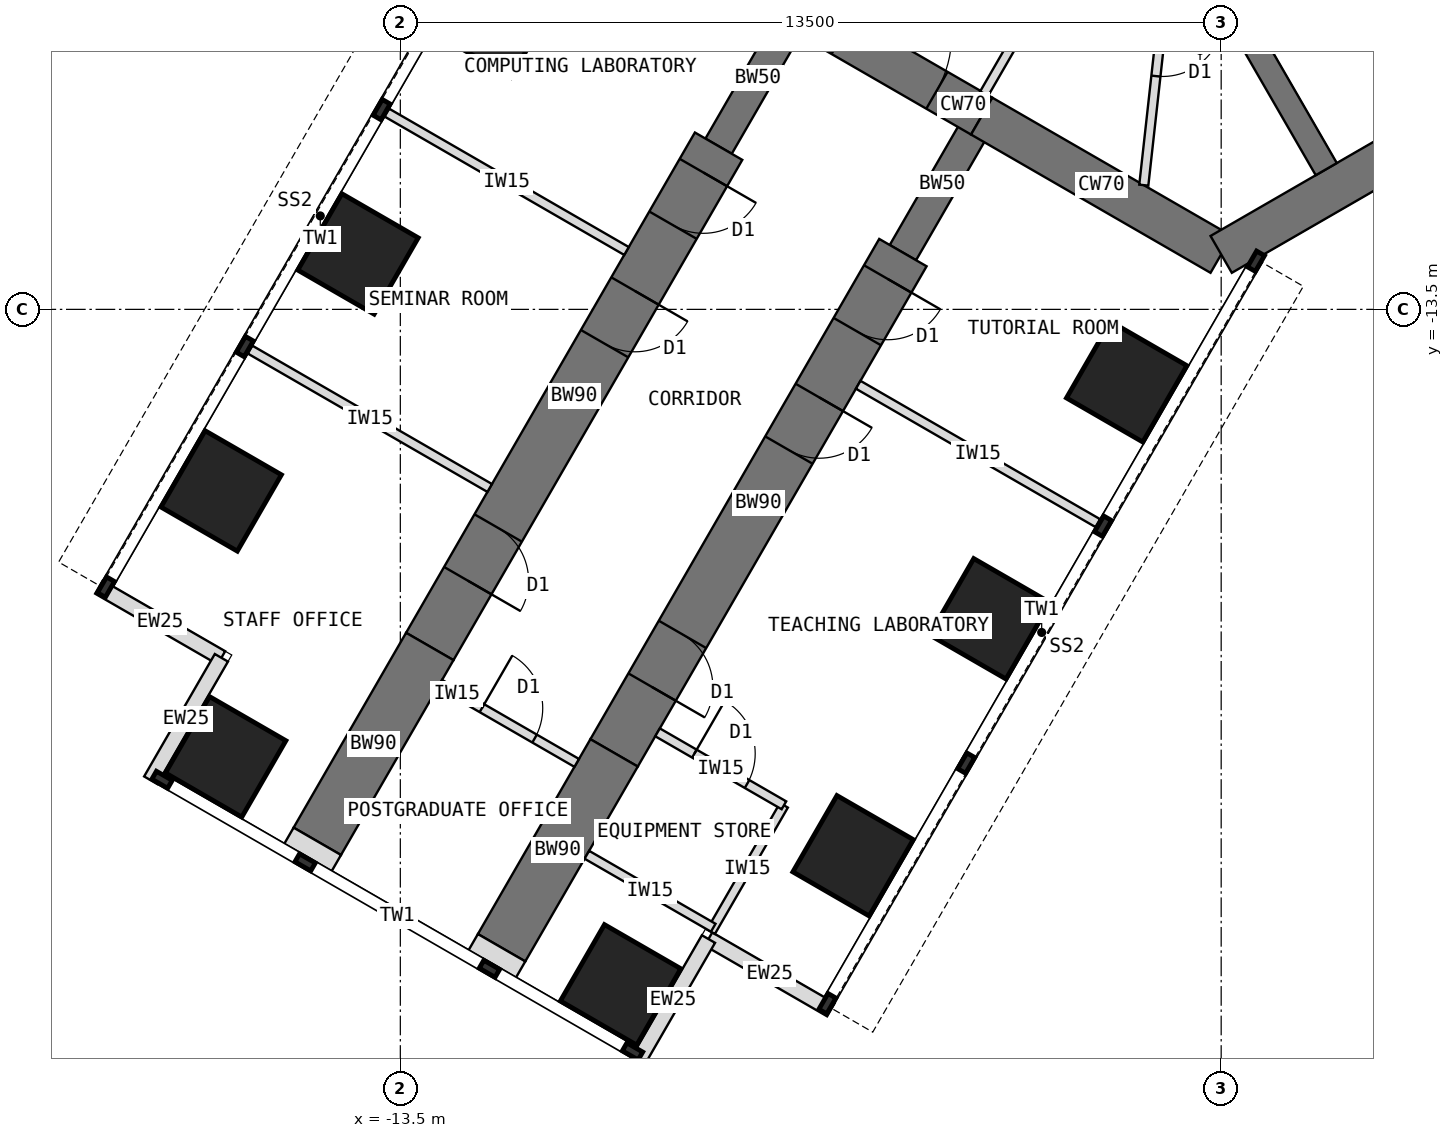
"""IFC4 building model, lengths in metres.
Left out: names, types, materials, properties, quantities, classifications, styles, units other than length and angle.
Written with IfcOpenShell. Run it as: python <this file> out.ifc"""

import sys

from ifc_helpers import new_model, si_unit, direction, frame, frame_2d, origin, origin_2d, place, context, subcontext, project, spatial, rectangle, extrude, element, fill, save


model = new_model("IFC4")
c1 = context("Model", 3, precision=1e-05, world=origin(), true_north=direction((0.0, 1.0)))
c2 = subcontext(c1, "Body", "Model", "MODEL_VIEW")
j1 = project(units=[si_unit("LENGTHUNIT", "METRE"), si_unit("PLANEANGLEUNIT", "RADIAN")], contexts=[c1])
p1 = place(None, origin())
s1 = spatial("IfcSite", under=j1, at=p1, CompositionType="ELEMENT")
p2 = place(p1, origin())
s2 = spatial("IfcBuilding", under=s1, at=p2, CompositionType="ELEMENT")
p3 = place(p2, frame((0.0, 0.0, 56.5)))
s3 = spatial("IfcBuildingStorey", under=s2, at=p3, CompositionType="ELEMENT", Elevation=56.5)
p4 = place(p3, frame((-6.97, -8.572, 0.0), z_axis=(0.0, 0.0, 1.0), x_axis=(0.866019471182, -0.500010275428, 0.0)))
e1 = element("IfcWall", 1, at=p4, inside=s3, PredefinedType="SHEAR", context=c2, shape_type="SweptSolid", body=[
    extrude(rectangle(XDim=3.5, YDim=0.7, at=frame_2d((1.75, 0.0))), origin(), (0.0, 0.0, 1.0), 4.0),
])
p5 = place(p4, frame((0.85, 0.0, 0.0)))
e2 = element("IfcOpeningElement", 2, at=p5, cuts=e1, PredefinedType="OPENING", context=c2, shape_type="SweptSolid", body=[
    extrude(rectangle(XDim=1.8, YDim=2.1, at=frame_2d((0.9, 1.05))), frame((0.0, 0.36, 0.0), z_axis=(0.0, -1.0, 0.0), x_axis=(1.0, 0.0, 0.0)), (0.0, 0.0, 1.0), 0.72),
])
p6 = place(p3, frame((-3.939, -10.322, 0.0), z_axis=(0.0, 0.0, 1.0), x_axis=(0.866011268655, -0.500024481964, 0.0)))
e3 = element("IfcWall", 3, at=p6, inside=s3, PredefinedType="SHEAR", context=c2, shape_type="SweptSolid", body=[
    extrude(rectangle(XDim=4.548, YDim=0.7, at=frame_2d((2.274, 0.0))), origin(), (0.0, 0.0, 1.0), 4.0),
])
p7 = place(p3, frame((0.0, -12.596, 0.0), z_axis=(0.0, 0.0, 1.0), x_axis=(0.866021940709, 0.500005998175, 0.0)))
e4 = element("IfcWall", 4, at=p7, inside=s3, PredefinedType="SHEAR", context=c2, shape_type="SweptSolid", body=[
    extrude(rectangle(XDim=12.596, YDim=0.7, at=frame_2d((6.298, 0.0))), origin(), (0.0, 0.0, 1.0), 4.0),
])
p8 = place(p3, frame((-3.939, -10.322, 0.0), z_axis=(0.0, 0.0, 1.0), x_axis=(-0.499918158782, -0.866072649678, 0.0)))
e5 = element("IfcWall", 5, at=p8, inside=s3, PredefinedType="SHEAR", context=c2, shape_type="SweptSolid", body=[
    extrude(rectangle(XDim=2.592, YDim=0.5, at=frame_2d((1.296, 0.0))), origin(), (0.0, 0.0, 1.0), 4.0),
])
p9 = place(p3, frame((-5.234, -12.566, 0.0), z_axis=(0.0, 0.0, 1.0), x_axis=(-0.499997557548, -0.86602681393, 0.0)))
e6 = element("IfcWall", 6, at=p9, inside=s3, PredefinedType="SHEAR", context=c2, shape_type="SweptSolid", body=[
    extrude(rectangle(XDim=9.5, YDim=0.9, at=frame_2d((4.75, 0.0))), origin(), (0.0, 0.0, 1.0), 4.0),
])
p10 = place(p9, frame((0.5, 0.0, 0.0)))
e7 = element("IfcOpeningElement", 7, at=p10, cuts=e6, PredefinedType="OPENING", context=c2, shape_type="SweptSolid", body=[
    extrude(rectangle(XDim=1.0, YDim=2.1, at=frame_2d((0.5, 1.05))), frame((0.0, 0.46, 0.0), z_axis=(0.0, -1.0, 0.0), x_axis=(1.0, 0.0, 0.0)), (0.0, 0.0, 1.0), 0.92),
])
p11 = place(p9, frame((2.75, 0.0, 0.0)))
e8 = element("IfcOpeningElement", 8, at=p11, cuts=e6, PredefinedType="OPENING", context=c2, shape_type="SweptSolid", body=[
    extrude(rectangle(XDim=1.0, YDim=2.1, at=frame_2d((0.5, 1.05))), frame((0.0, 0.46, 0.0), z_axis=(0.0, -1.0, 0.0), x_axis=(1.0, 0.0, 0.0)), (0.0, 0.0, 1.0), 0.92),
])
p12 = place(p9, frame((7.25, 0.0, 0.0)))
e9 = element("IfcOpeningElement", 9, at=p12, cuts=e6, PredefinedType="OPENING", context=c2, shape_type="SweptSolid", body=[
    extrude(rectangle(XDim=1.0, YDim=2.1, at=frame_2d((0.5, 1.05))), frame((0.0, 0.46, 0.0), z_axis=(0.0, -1.0, 0.0), x_axis=(1.0, 0.0, 0.0)), (0.0, 0.0, 1.0), 0.92),
])
p13 = place(p3, frame((-9.984, -20.794, 0.0), z_axis=(0.0, 0.0, 1.0), x_axis=(-0.500042316284, -0.866000971088, 0.0)))
e10 = element("IfcWall", 10, at=p13, inside=s3, PredefinedType="SHEAR", context=c2, shape_type="SweptSolid", body=[
    extrude(rectangle(XDim=3.7, YDim=0.9, at=frame_2d((1.85, 0.0))), origin(), (0.0, 0.0, 1.0), 4.0),
])
p14 = place(p3, frame((-6.97, -8.572, 0.0), z_axis=(0.0, 0.0, 1.0), x_axis=(-0.499988811324, -0.866031863473, 0.0)))
e11 = element("IfcWall", 11, at=p14, inside=s3, PredefinedType="SHEAR", context=c2, shape_type="SweptSolid", body=[
    extrude(rectangle(XDim=2.592, YDim=0.5, at=frame_2d((1.296, 0.0))), origin(), (0.0, 0.0, 1.0), 4.0),
])
p15 = place(p3, frame((-8.266, -10.816, 0.0), z_axis=(0.0, 0.0, 1.0), x_axis=(-0.499997557548, -0.86602681393, 0.0)))
e12 = element("IfcWall", 12, at=p15, inside=s3, PredefinedType="SHEAR", context=c2, shape_type="SweptSolid", body=[
    extrude(rectangle(XDim=9.5, YDim=0.9, at=frame_2d((4.75, 0.0))), origin(), (0.0, 0.0, 1.0), 4.0),
])
p16 = place(p15, frame((0.5, 0.0, 0.0)))
e13 = element("IfcOpeningElement", 13, at=p16, cuts=e12, PredefinedType="OPENING", context=c2, shape_type="SweptSolid", body=[
    extrude(rectangle(XDim=1.0, YDim=2.1, at=frame_2d((0.5, 1.05))), frame((0.0, 0.46, 0.0), z_axis=(0.0, -1.0, 0.0), x_axis=(1.0, 0.0, 0.0)), (0.0, 0.0, 1.0), 0.92),
])
p17 = place(p15, frame((2.75, 0.0, 0.0)))
e14 = element("IfcOpeningElement", 14, at=p17, cuts=e12, PredefinedType="OPENING", context=c2, shape_type="SweptSolid", body=[
    extrude(rectangle(XDim=1.0, YDim=2.1, at=frame_2d((0.5, 1.05))), frame((0.0, 0.46, 0.0), z_axis=(0.0, -1.0, 0.0), x_axis=(1.0, 0.0, 0.0)), (0.0, 0.0, 1.0), 0.92),
])
p18 = place(p15, frame((7.25, 0.0, 0.0)))
e15 = element("IfcOpeningElement", 15, at=p18, cuts=e12, PredefinedType="OPENING", context=c2, shape_type="SweptSolid", body=[
    extrude(rectangle(XDim=1.0, YDim=2.1, at=frame_2d((0.5, 1.05))), frame((0.0, 0.46, 0.0), z_axis=(0.0, -1.0, 0.0), x_axis=(1.0, 0.0, 0.0)), (0.0, 0.0, 1.0), 0.92),
])
p19 = place(p3, frame((-13.016, -19.044, 0.0), z_axis=(0.0, 0.0, 1.0), x_axis=(-0.499992827086, -0.866029545028, 0.0)))
e16 = element("IfcWall", 16, at=p19, inside=s3, PredefinedType="SHEAR", context=c2, shape_type="SweptSolid", body=[
    extrude(rectangle(XDim=3.7, YDim=0.9, at=frame_2d((1.85, 0.0))), origin(), (0.0, 0.0, 1.0), 4.0),
])
for number, where, z_axis, x_axis in (
    (17, (-1.554, -14.691, 0.0), (0.0, 0.0, 1.0), (0.5, 0.866, 0.0)),
    (18, (-11.946, -8.691, 0.0), (0.0, 0.0, 1.0), (0.5, 0.866, 0.0)),
    (19, (-3.804, -18.588, 0.0), (0.0, 0.0, 1.0), (0.5, 0.866, 0.0)),
    (20, (-14.196, -12.588, 0.0), (0.0, 0.0, 1.0), (0.5, 0.866, 0.0)),
    (21, (-6.054, -22.486, 0.0), (0.0, 0.0, 1.0), (0.5, 0.866, 0.0)),
    (22, (-16.446, -16.486, 0.0), (0.0, 0.0, 1.0), (0.5, 0.866, 0.0)),
    (23, (-9.877, -24.608, 0.0), (0.0, 0.0, 1.0), (0.5, 0.866, 0.0)),
    (24, (-16.373, -20.858, 0.0), (0.0, 0.0, 1.0), (0.5, 0.866, 0.0)),
):
    element("IfcColumn", number, at=place(p3, frame(where, z_axis=z_axis, x_axis=x_axis)), inside=s3, PredefinedType="COLUMN", context=c2, shape_type="SweptSolid", body=[
        extrude(rectangle(XDim=1.45, YDim=1.45, at=origin_2d()), origin(), (0.0, 0.0, 1.0), 4.0),
    ])
for number, where, z_axis, x_axis in (
    (25, (-6.419, -25.017, 0.0), (0.0, 0.0, 1.0), (-0.866, 0.5, 0.0)),
    (26, (-8.432, -23.855, 0.0), (0.0, 0.0, 1.0), (-0.5, -0.866, 0.0)),
    (27, (-18.456, -18.067, 0.0), (0.0, 0.0, 1.0), (0.866, -0.5, 0.0)),
    (28, (-16.443, -19.23, 0.0), (0.0, 0.0, 1.0), (-0.5, -0.866, 0.0)),
):
    element("IfcWall", number, at=place(p3, frame(where, z_axis=z_axis, x_axis=x_axis)), inside=s3, PredefinedType="STANDARD", context=c2, shape_type="SweptSolid", body=[
        extrude(rectangle(XDim=2.325, YDim=0.25, at=frame_2d((1.163, 0.0))), origin(), (0.0, 0.0, 1.0), 3.8),
    ])
for number, where, z_axis, x_axis in (
    (29, (-11.834, -23.998, 0.0), (0.0, 0.0, 1.0), (-0.5, -0.866, 0.0)),
    (30, (-14.865, -22.248, 0.0), (0.0, 0.0, 1.0), (-0.5, -0.866, 0.0)),
):
    element("IfcWall", number, at=place(p3, frame(where, z_axis=z_axis, x_axis=x_axis)), inside=s3, PredefinedType="PARTITIONING", context=c2, shape_type="SweptSolid", body=[
        extrude(rectangle(XDim=0.31, YDim=0.9, at=frame_2d((0.155, 0.0))), origin(), (0.0, 0.0, 1.0), 3.8),
    ])
p20 = place(p3, frame((-1.201, -6.12, 0.0), z_axis=(0.0, 0.0, 1.0), x_axis=(0.500002627198, -0.866023886965, 0.0)))
e31 = element("IfcWall", 31, at=p20, inside=s3, PredefinedType="SHEAR", context=c2, shape_type="SweptSolid", body=[
    extrude(rectangle(XDim=5.858, YDim=0.4, at=frame_2d((2.929, 0.0))), origin(), (0.0, 0.0, 1.0), 4.0),
])
p21 = place(p3, frame((-5.97, -14.74, 0.0), z_axis=(0.0, 0.0, 1.0), x_axis=(0.866035472144, -0.499982560684, 0.0)))
e32 = element("IfcWall", 32, at=p21, inside=s3, PredefinedType="PARTITIONING", context=c2, shape_type="SweptSolid", body=[
    extrude(rectangle(XDim=4.55, YDim=0.15, at=frame_2d((2.275, 0.0))), origin(), (0.0, 0.0, 1.0), 3.8),
])
p22 = place(p3, frame((-7.191, -21.656, 0.0), z_axis=(0.0, 0.0, 1.0), x_axis=(-0.500077600433, -0.865980596518, 0.0)))
e33 = element("IfcWall", 33, at=p22, inside=s3, PredefinedType="PARTITIONING", context=c2, shape_type="SweptSolid", body=[
    extrude(rectangle(XDim=2.4, YDim=0.15, at=frame_2d((1.2, 0.0))), origin(), (0.0, 0.0, 1.0), 3.8),
])
p23 = place(p3, frame((-9.27, -20.456, 0.0), z_axis=(0.0, 0.0, 1.0), x_axis=(0.866006032174, -0.500033551112, 0.0)))
e34 = element("IfcWall", 34, at=p23, inside=s3, PredefinedType="PARTITIONING", context=c2, shape_type="SweptSolid", body=[
    extrude(rectangle(XDim=2.4, YDim=0.15, at=frame_2d((1.2, 0.0))), origin(), (0.0, 0.0, 1.0), 3.8),
])
p24 = place(p23, frame((0.7, 0.0, 0.0)))
e35 = element("IfcOpeningElement", 35, at=p24, cuts=e34, PredefinedType="OPENING", context=c2, shape_type="SweptSolid", body=[
    extrude(rectangle(XDim=1.0, YDim=2.1, at=frame_2d((0.5, 1.05))), frame((0.0, 0.085, 0.0), z_axis=(0.0, -1.0, 0.0), x_axis=(1.0, 0.0, 0.0)), (0.0, 0.0, 1.0), 0.17),
])
p25 = place(p3, frame((-10.432, -22.469, 0.0), z_axis=(0.0, 0.0, 1.0), x_axis=(0.866024647952, -0.500001309137, 0.0)))
e36 = element("IfcWall", 36, at=p25, inside=s3, PredefinedType="PARTITIONING", context=c2, shape_type="SweptSolid", body=[
    extrude(rectangle(XDim=2.4, YDim=0.15, at=frame_2d((1.2, 0.0))), origin(), (0.0, 0.0, 1.0), 3.8),
])
for number, where, z_axis, x_axis in (
    (37, (-9.78, -12.54, 0.0), (0.0, 0.0, 1.0), (-0.866, 0.5, 0.0)),
    (38, (-12.03, -16.437, 0.0), (0.0, 0.0, 1.0), (-0.866, 0.5, 0.0)),
):
    element("IfcWall", number, at=place(p3, frame(where, z_axis=z_axis, x_axis=x_axis)), inside=s3, PredefinedType="PARTITIONING", context=c2, shape_type="SweptSolid", body=[
        extrude(rectangle(XDim=4.55, YDim=0.15, at=frame_2d((2.275, 0.0))), origin(), (0.0, 0.0, 1.0), 3.8),
    ])
p26 = place(p3, frame((-1.664, -6.083, 0.0), z_axis=(0.0, 0.0, 1.0), x_axis=(-0.499999927604, -0.866025445582, 0.0)))
e39 = element("IfcWall", 39, at=p26, inside=s3, PredefinedType="PARTITIONING", context=c2, shape_type="SweptSolid", body=[
    extrude(rectangle(XDim=4.468, YDim=0.15, at=frame_2d((2.234, 0.0))), origin(), (0.0, 0.0, 1.0), 3.8),
])
p27 = place(p26, frame((1.744, 0.0, 0.0)))
e40 = element("IfcOpeningElement", 40, at=p27, cuts=e39, PredefinedType="OPENING", context=c2, shape_type="SweptSolid", body=[
    extrude(rectangle(XDim=1.0, YDim=2.1, at=frame_2d((0.5, 1.05))), frame((0.0, 0.085, 0.0), z_axis=(0.0, -1.0, 0.0), x_axis=(1.0, 0.0, 0.0)), (0.0, 0.0, 1.0), 0.17),
])
p28 = place(p3, frame((-0.764, -6.877, 0.0), z_axis=(0.0, 0.0, 1.0), x_axis=(-0.110408266965, -0.993886318744, 0.0)))
e41 = element("IfcWall", 41, at=p28, inside=s3, PredefinedType="PARTITIONING", context=c2, shape_type="SweptSolid", body=[
    extrude(rectangle(XDim=4.608, YDim=0.15, at=frame_2d((2.304, 0.0))), origin(), (0.0, 0.0, 1.0), 3.8),
])
p29 = place(p28, frame((1.804, 0.0, 0.0)))
e42 = element("IfcOpeningElement", 42, at=p29, cuts=e41, PredefinedType="OPENING", context=c2, shape_type="SweptSolid", body=[
    extrude(rectangle(XDim=1.0, YDim=2.1, at=frame_2d((0.5, 1.05))), frame((0.0, 0.085, 0.0), z_axis=(0.0, -1.0, 0.0), x_axis=(1.0, 0.0, 0.0)), (0.0, 0.0, 1.0), 0.17),
])
p30 = place(p3, frame((-12.851, -19.658, 0.0), z_axis=(0.0, 0.0, 1.0), x_axis=(0.866021400173, -0.500006934395, 0.0)))
e43 = element("IfcWall", 43, at=p30, inside=s3, PredefinedType="PARTITIONING", context=c2, shape_type="SweptSolid", body=[
    extrude(rectangle(XDim=2.6, YDim=0.15, at=frame_2d((1.3, 0.0))), origin(), (0.0, 0.0, 1.0), 3.8),
])
p31 = place(p30, frame((0.8, 0.0, 0.0)))
e44 = element("IfcOpeningElement", 44, at=p31, cuts=e43, PredefinedType="OPENING", context=c2, shape_type="SweptSolid", body=[
    extrude(rectangle(XDim=1.0, YDim=2.1, at=frame_2d((0.5, 1.05))), frame((0.0, 0.085, 0.0), z_axis=(0.0, -1.0, 0.0), x_axis=(1.0, 0.0, 0.0)), (0.0, 0.0, 1.0), 0.17),
])
p32 = place(p5, origin())
e45 = element("IfcDoor", 45, at=p32, inside=s3, OperationType="DOUBLE_DOOR_DOUBLE_SWING", PredefinedType="DOOR", context=c2, shape_type="SweptSolid", body=[
    extrude(rectangle(XDim=1.72, YDim=2.06, at=frame_2d((0.9, 1.03))), frame((0.0, 0.025, 0.0), z_axis=(0.0, -1.0, 0.0), x_axis=(1.0, 0.0, 0.0)), (0.0, 0.0, 1.0), 0.05),
    extrude(rectangle(XDim=0.04, YDim=2.1, at=frame_2d((0.02, 1.05))), frame((0.0, 0.35, 0.0), z_axis=(0.0, -1.0, 0.0), x_axis=(1.0, 0.0, 0.0)), (0.0, 0.0, 1.0), 0.699),
    extrude(rectangle(XDim=0.04, YDim=2.1, at=frame_2d((1.78, 1.05))), frame((0.0, 0.35, 0.0), z_axis=(0.0, -1.0, 0.0), x_axis=(1.0, 0.0, 0.0)), (0.0, 0.0, 1.0), 0.699),
    extrude(rectangle(XDim=1.72, YDim=0.04, at=frame_2d((0.9, 2.08))), frame((0.0, 0.35, 0.0), z_axis=(0.0, -1.0, 0.0), x_axis=(1.0, 0.0, 0.0)), (0.0, 0.0, 1.0), 0.699),
])
fill(e2, e45)
p33 = place(p24, origin())
e46 = element("IfcDoor", 46, at=p33, inside=s3, OperationType="SINGLE_SWING_LEFT", PredefinedType="DOOR", context=c2, shape_type="SweptSolid", body=[
    extrude(rectangle(XDim=1.0, YDim=2.1, at=frame_2d((0.5, 1.05))), frame((0.0, 0.025, 0.0), z_axis=(0.0, -1.0, 0.0), x_axis=(1.0, 0.0, 0.0)), (0.0, 0.0, 1.0), 0.05),
])
fill(e35, e46)
p34 = place(p29, origin())
e47 = element("IfcDoor", 47, at=p34, inside=s3, OperationType="SINGLE_SWING_LEFT", PredefinedType="DOOR", context=c2, shape_type="SweptSolid", body=[
    extrude(rectangle(XDim=1.0, YDim=2.1, at=frame_2d((0.5, 1.05))), frame((0.0, 0.025, 0.0), z_axis=(0.0, -1.0, 0.0), x_axis=(1.0, 0.0, 0.0)), (0.0, 0.0, 1.0), 0.05),
])
fill(e42, e47)
p35 = place(p31, origin())
e48 = element("IfcDoor", 48, at=p35, inside=s3, OperationType="SINGLE_SWING_LEFT", PredefinedType="DOOR", context=c2, shape_type="SweptSolid", body=[
    extrude(rectangle(XDim=1.0, YDim=2.1, at=frame_2d((0.5, 1.05))), frame((0.0, 0.025, 0.0), z_axis=(0.0, -1.0, 0.0), x_axis=(1.0, 0.0, 0.0)), (0.0, 0.0, 1.0), 0.05),
])
fill(e44, e48)
p36 = place(p10, origin())
e49 = element("IfcDoor", 49, at=p36, inside=s3, OperationType="SINGLE_SWING_LEFT", PredefinedType="DOOR", context=c2, shape_type="SweptSolid", body=[
    extrude(rectangle(XDim=0.92, YDim=2.06, at=frame_2d((0.5, 1.03))), frame((0.0, 0.025, 0.0), z_axis=(0.0, -1.0, 0.0), x_axis=(1.0, 0.0, 0.0)), (0.0, 0.0, 1.0), 0.05),
    extrude(rectangle(XDim=0.04, YDim=2.1, at=frame_2d((0.02, 1.05))), frame((0.0, 0.45, 0.0), z_axis=(0.0, -1.0, 0.0), x_axis=(1.0, 0.0, 0.0)), (0.0, 0.0, 1.0), 0.899),
    extrude(rectangle(XDim=0.04, YDim=2.1, at=frame_2d((0.98, 1.05))), frame((0.0, 0.45, 0.0), z_axis=(0.0, -1.0, 0.0), x_axis=(1.0, 0.0, 0.0)), (0.0, 0.0, 1.0), 0.899),
    extrude(rectangle(XDim=0.92, YDim=0.04, at=frame_2d((0.5, 2.08))), frame((0.0, 0.45, 0.0), z_axis=(0.0, -1.0, 0.0), x_axis=(1.0, 0.0, 0.0)), (0.0, 0.0, 1.0), 0.899),
])
fill(e7, e49)
p37 = place(p11, origin())
e50 = element("IfcDoor", 50, at=p37, inside=s3, OperationType="SINGLE_SWING_LEFT", PredefinedType="DOOR", context=c2, shape_type="SweptSolid", body=[
    extrude(rectangle(XDim=0.92, YDim=2.06, at=frame_2d((0.5, 1.03))), frame((0.0, 0.025, 0.0), z_axis=(0.0, -1.0, 0.0), x_axis=(1.0, 0.0, 0.0)), (0.0, 0.0, 1.0), 0.05),
    extrude(rectangle(XDim=0.04, YDim=2.1, at=frame_2d((0.02, 1.05))), frame((0.0, 0.45, 0.0), z_axis=(0.0, -1.0, 0.0), x_axis=(1.0, 0.0, 0.0)), (0.0, 0.0, 1.0), 0.899),
    extrude(rectangle(XDim=0.04, YDim=2.1, at=frame_2d((0.98, 1.05))), frame((0.0, 0.45, 0.0), z_axis=(0.0, -1.0, 0.0), x_axis=(1.0, 0.0, 0.0)), (0.0, 0.0, 1.0), 0.899),
    extrude(rectangle(XDim=0.92, YDim=0.04, at=frame_2d((0.5, 2.08))), frame((0.0, 0.45, 0.0), z_axis=(0.0, -1.0, 0.0), x_axis=(1.0, 0.0, 0.0)), (0.0, 0.0, 1.0), 0.899),
])
fill(e8, e50)
p38 = place(p12, origin())
e51 = element("IfcDoor", 51, at=p38, inside=s3, OperationType="SINGLE_SWING_RIGHT", PredefinedType="DOOR", context=c2, shape_type="SweptSolid", body=[
    extrude(rectangle(XDim=0.92, YDim=2.06, at=frame_2d((0.5, 1.03))), frame((0.0, 0.025, 0.0), z_axis=(0.0, -1.0, 0.0), x_axis=(1.0, 0.0, 0.0)), (0.0, 0.0, 1.0), 0.05),
    extrude(rectangle(XDim=0.04, YDim=2.1, at=frame_2d((0.02, 1.05))), frame((0.0, 0.45, 0.0), z_axis=(0.0, -1.0, 0.0), x_axis=(1.0, 0.0, 0.0)), (0.0, 0.0, 1.0), 0.899),
    extrude(rectangle(XDim=0.04, YDim=2.1, at=frame_2d((0.98, 1.05))), frame((0.0, 0.45, 0.0), z_axis=(0.0, -1.0, 0.0), x_axis=(1.0, 0.0, 0.0)), (0.0, 0.0, 1.0), 0.899),
    extrude(rectangle(XDim=0.92, YDim=0.04, at=frame_2d((0.5, 2.08))), frame((0.0, 0.45, 0.0), z_axis=(0.0, -1.0, 0.0), x_axis=(1.0, 0.0, 0.0)), (0.0, 0.0, 1.0), 0.899),
])
fill(e9, e51)
p39 = place(p16, origin())
e52 = element("IfcDoor", 52, at=p39, inside=s3, OperationType="SINGLE_SWING_LEFT", PredefinedType="DOOR", context=c2, shape_type="SweptSolid", body=[
    extrude(rectangle(XDim=0.92, YDim=2.06, at=frame_2d((0.5, 1.03))), frame((0.0, 0.025, 0.0), z_axis=(0.0, -1.0, 0.0), x_axis=(1.0, 0.0, 0.0)), (0.0, 0.0, 1.0), 0.05),
    extrude(rectangle(XDim=0.04, YDim=2.1, at=frame_2d((0.02, 1.05))), frame((0.0, 0.45, 0.0), z_axis=(0.0, -1.0, 0.0), x_axis=(1.0, 0.0, 0.0)), (0.0, 0.0, 1.0), 0.899),
    extrude(rectangle(XDim=0.04, YDim=2.1, at=frame_2d((0.98, 1.05))), frame((0.0, 0.45, 0.0), z_axis=(0.0, -1.0, 0.0), x_axis=(1.0, 0.0, 0.0)), (0.0, 0.0, 1.0), 0.899),
    extrude(rectangle(XDim=0.92, YDim=0.04, at=frame_2d((0.5, 2.08))), frame((0.0, 0.45, 0.0), z_axis=(0.0, -1.0, 0.0), x_axis=(1.0, 0.0, 0.0)), (0.0, 0.0, 1.0), 0.899),
])
fill(e13, e52)
p40 = place(p17, origin())
e53 = element("IfcDoor", 53, at=p40, inside=s3, OperationType="SINGLE_SWING_LEFT", PredefinedType="DOOR", context=c2, shape_type="SweptSolid", body=[
    extrude(rectangle(XDim=0.92, YDim=2.06, at=frame_2d((0.5, 1.03))), frame((0.0, 0.025, 0.0), z_axis=(0.0, -1.0, 0.0), x_axis=(1.0, 0.0, 0.0)), (0.0, 0.0, 1.0), 0.05),
    extrude(rectangle(XDim=0.04, YDim=2.1, at=frame_2d((0.02, 1.05))), frame((0.0, 0.45, 0.0), z_axis=(0.0, -1.0, 0.0), x_axis=(1.0, 0.0, 0.0)), (0.0, 0.0, 1.0), 0.899),
    extrude(rectangle(XDim=0.04, YDim=2.1, at=frame_2d((0.98, 1.05))), frame((0.0, 0.45, 0.0), z_axis=(0.0, -1.0, 0.0), x_axis=(1.0, 0.0, 0.0)), (0.0, 0.0, 1.0), 0.899),
    extrude(rectangle(XDim=0.92, YDim=0.04, at=frame_2d((0.5, 2.08))), frame((0.0, 0.45, 0.0), z_axis=(0.0, -1.0, 0.0), x_axis=(1.0, 0.0, 0.0)), (0.0, 0.0, 1.0), 0.899),
])
fill(e14, e53)
p41 = place(p18, origin())
e54 = element("IfcDoor", 54, at=p41, inside=s3, OperationType="SINGLE_SWING_RIGHT", PredefinedType="DOOR", context=c2, shape_type="SweptSolid", body=[
    extrude(rectangle(XDim=0.92, YDim=2.06, at=frame_2d((0.5, 1.03))), frame((0.0, 0.025, 0.0), z_axis=(0.0, -1.0, 0.0), x_axis=(1.0, 0.0, 0.0)), (0.0, 0.0, 1.0), 0.05),
    extrude(rectangle(XDim=0.04, YDim=2.1, at=frame_2d((0.02, 1.05))), frame((0.0, 0.45, 0.0), z_axis=(0.0, -1.0, 0.0), x_axis=(1.0, 0.0, 0.0)), (0.0, 0.0, 1.0), 0.899),
    extrude(rectangle(XDim=0.04, YDim=2.1, at=frame_2d((0.98, 1.05))), frame((0.0, 0.45, 0.0), z_axis=(0.0, -1.0, 0.0), x_axis=(1.0, 0.0, 0.0)), (0.0, 0.0, 1.0), 0.899),
    extrude(rectangle(XDim=0.92, YDim=0.04, at=frame_2d((0.5, 2.08))), frame((0.0, 0.45, 0.0), z_axis=(0.0, -1.0, 0.0), x_axis=(1.0, 0.0, 0.0)), (0.0, 0.0, 1.0), 0.899),
])
fill(e15, e54)
save(model, sys.argv[1])
